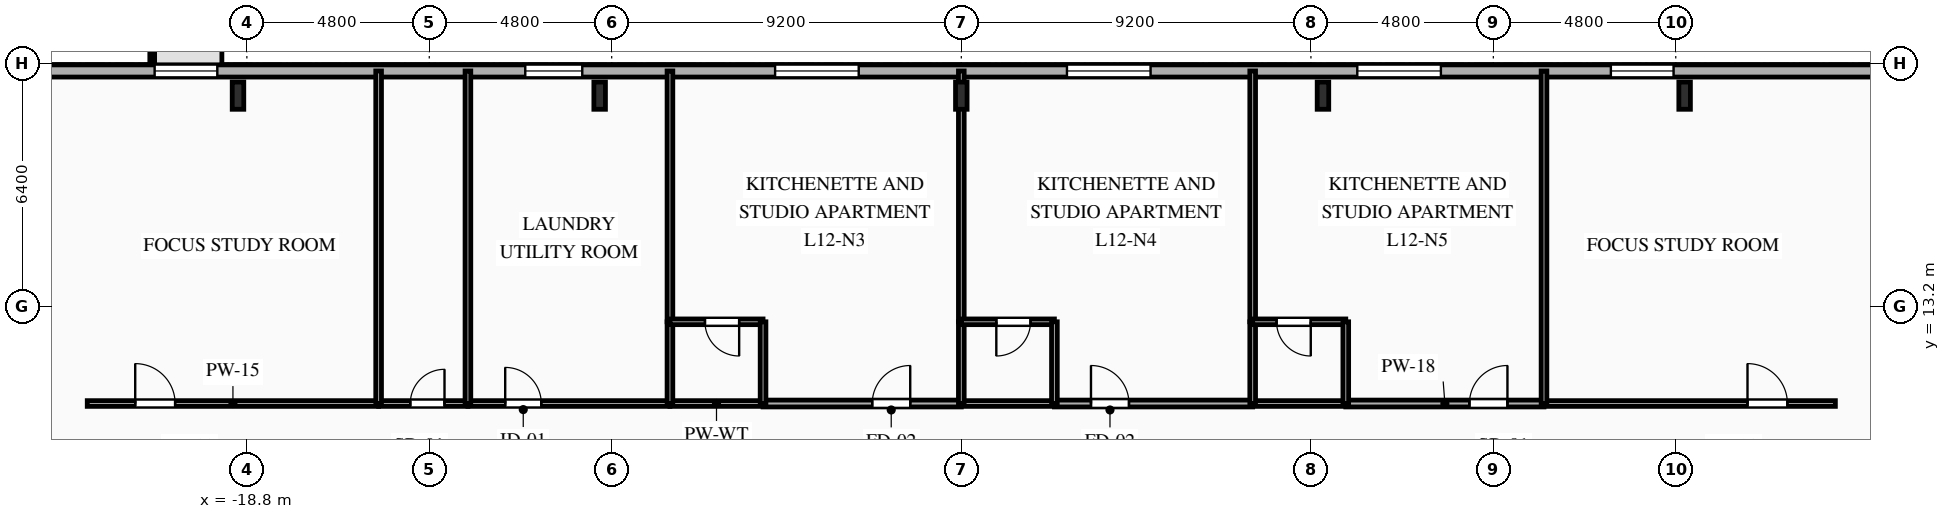
"""IFC4 building model, lengths in metres.
Left out: names, types, materials, properties, quantities, classifications, styles, units other than length and angle.
Written with IfcOpenShell. Run it as: python <this file> out.ifc"""

import sys

from ifc_helpers import new_model, si_unit, direction, frame, frame_2d, origin, origin_2d, place, context, subcontext, project, spatial, rectangle, i_section, extrude, element, fill, save


model = new_model("IFC4")
c1 = context("Model", 3, precision=1e-05, world=origin(), true_north=direction((0.0, 1.0)))
c2 = subcontext(c1, "Body", "Model", "MODEL_VIEW")
j1 = project(units=[si_unit("LENGTHUNIT", "METRE"), si_unit("PLANEANGLEUNIT", "RADIAN")], contexts=[c1])
p1 = place(None, origin())
s1 = spatial("IfcSite", under=j1, at=p1, CompositionType="ELEMENT")
p2 = place(p1, origin())
s2 = spatial("IfcBuilding", under=s1, at=p2, CompositionType="ELEMENT")
p3 = place(p2, frame((0.0, 0.0, 47.1)))
s3 = spatial("IfcBuildingStorey", under=s2, at=p3, CompositionType="ELEMENT", Elevation=47.1)
for number, where, z_axis, x_axis in (
    (1, (19.033, 18.75, 0.0), (0.0, 0.0, 1.0), (1.0, 0.0, 0.0)),
    (2, (9.517, 18.75, 0.0), (0.0, 0.0, 1.0), (1.0, 0.0, 0.0)),
    (3, (0.0, 18.75, 0.0), (0.0, 0.0, 1.0), (1.0, 0.0, 0.0)),
    (4, (-9.517, 18.75, 0.0), (0.0, 0.0, 1.0), (1.0, 0.0, 0.0)),
    (5, (-19.033, 18.75, 0.0), (0.0, 0.0, 1.0), (1.0, 0.0, 0.0)),
):
    element("IfcColumn", number, at=place(p3, frame(where, z_axis=z_axis, x_axis=x_axis)), inside=s3, PredefinedType="COLUMN", context=c2, shape_type="SweptSolid", body=[
        extrude(i_section(OverallWidth=0.304, OverallDepth=0.716, WebThickness=0.021, FlangeThickness=0.04, FilletRadius=0.027, at=origin_2d()), origin(), (0.0, 0.0, 1.0), 3.35),
    ])
p4 = place(p3, frame((-29.2, 19.4, 0.0), z_axis=(0.0, 0.0, 1.0), x_axis=(1.0, 0.0, 0.0)))
e6 = element("IfcWall", 6, at=p4, inside=s3, PredefinedType="SOLIDWALL", context=c2, shape_type="SweptSolid", body=[
    extrude(rectangle(XDim=58.4, YDim=0.32, at=frame_2d((29.2, 0.0))), origin(), (0.0, 0.0, 1.0), 3.035),
])
p5 = place(p4, frame((7.972, 0.0, 0.85)))
e7 = element("IfcOpeningElement", 7, at=p5, cuts=e6, PredefinedType="OPENING", context=c2, shape_type="SweptSolid", body=[
    extrude(rectangle(XDim=1.65, YDim=1.85, at=frame_2d((0.825, 0.925))), frame((0.0, 0.17, 0.0), z_axis=(0.0, -1.0, 0.0), x_axis=(1.0, 0.0, 0.0)), (0.0, 0.0, 1.0), 0.34),
])
p6 = place(p4, frame((17.726, 0.0, 0.85)))
e8 = element("IfcOpeningElement", 8, at=p6, cuts=e6, PredefinedType="OPENING", context=c2, shape_type="SweptSolid", body=[
    extrude(rectangle(XDim=1.5, YDim=1.85, at=frame_2d((0.75, 0.925))), frame((0.0, 0.17, 0.0), z_axis=(0.0, -1.0, 0.0), x_axis=(1.0, 0.0, 0.0)), (0.0, 0.0, 1.0), 0.34),
])
p7 = place(p4, frame((24.3, 0.0, 0.85)))
e9 = element("IfcOpeningElement", 9, at=p7, cuts=e6, PredefinedType="OPENING", context=c2, shape_type="SweptSolid", body=[
    extrude(rectangle(XDim=2.2, YDim=1.85, at=frame_2d((1.1, 0.925))), frame((0.0, 0.17, 0.0), z_axis=(0.0, -1.0, 0.0), x_axis=(1.0, 0.0, 0.0)), (0.0, 0.0, 1.0), 0.34),
])
p8 = place(p4, frame((31.98, 0.0, 0.85)))
e10 = element("IfcOpeningElement", 10, at=p8, cuts=e6, PredefinedType="OPENING", context=c2, shape_type="SweptSolid", body=[
    extrude(rectangle(XDim=2.2, YDim=1.85, at=frame_2d((1.1, 0.925))), frame((0.0, 0.17, 0.0), z_axis=(0.0, -1.0, 0.0), x_axis=(1.0, 0.0, 0.0)), (0.0, 0.0, 1.0), 0.34),
])
p9 = place(p4, frame((39.62, 0.0, 0.85)))
e11 = element("IfcOpeningElement", 11, at=p9, cuts=e6, PredefinedType="OPENING", context=c2, shape_type="SweptSolid", body=[
    extrude(rectangle(XDim=2.2, YDim=1.85, at=frame_2d((1.1, 0.925))), frame((0.0, 0.17, 0.0), z_axis=(0.0, -1.0, 0.0), x_axis=(1.0, 0.0, 0.0)), (0.0, 0.0, 1.0), 0.34),
])
p10 = place(p4, frame((46.292, 0.0, 0.85)))
e12 = element("IfcOpeningElement", 12, at=p10, cuts=e6, PredefinedType="OPENING", context=c2, shape_type="SweptSolid", body=[
    extrude(rectangle(XDim=1.65, YDim=1.85, at=frame_2d((0.825, 0.925))), frame((0.0, 0.17, 0.0), z_axis=(0.0, -1.0, 0.0), x_axis=(1.0, 0.0, 0.0)), (0.0, 0.0, 1.0), 0.34),
])
p11 = place(p3, frame((-23.0, 10.65, 0.0), z_axis=(0.0, 0.0, 1.0), x_axis=(1.0, 0.0, 0.0)))
e13 = element("IfcWall", 13, at=p11, inside=s3, PredefinedType="PARTITIONING", context=c2, shape_type="SweptSolid", body=[
    extrude(rectangle(XDim=7.667, YDim=0.15, at=frame_2d((3.833, 0.0))), origin(), (0.0, 0.0, 1.0), 3.035),
])
p12 = place(p11, frame((1.262, 0.0, 0.0)))
e14 = element("IfcOpeningElement", 14, at=p12, cuts=e13, PredefinedType="OPENING", context=c2, shape_type="SweptSolid", body=[
    extrude(rectangle(XDim=1.05, YDim=2.15, at=frame_2d((0.525, 1.075))), frame((0.0, 0.085, 0.0), z_axis=(0.0, -1.0, 0.0), x_axis=(1.0, 0.0, 0.0)), (0.0, 0.0, 1.0), 0.17),
])
p13 = place(p3, frame((-15.333, 10.65, 0.0), z_axis=(0.0, 0.0, 1.0), x_axis=(1.0, 0.0, 0.0)))
e15 = element("IfcWall", 15, at=p13, inside=s3, PredefinedType="PLUMBINGWALL", context=c2, shape_type="SweptSolid", body=[
    extrude(rectangle(XDim=2.35, YDim=0.15, at=frame_2d((1.175, 0.0))), origin(), (0.0, 0.0, 1.0), 3.035),
])
p14 = place(p13, frame((0.834, 0.0, 0.0)))
e16 = element("IfcOpeningElement", 16, at=p14, cuts=e15, PredefinedType="OPENING", context=c2, shape_type="SweptSolid", body=[
    extrude(rectangle(XDim=0.9, YDim=2.1, at=frame_2d((0.45, 1.05))), frame((0.0, 0.085, 0.0), z_axis=(0.0, -1.0, 0.0), x_axis=(1.0, 0.0, 0.0)), (0.0, 0.0, 1.0), 0.17),
])
p15 = place(p3, frame((-12.983, 10.65, 0.0), z_axis=(0.0, 0.0, 1.0), x_axis=(1.0, 0.0, 0.0)))
e17 = element("IfcWall", 17, at=p15, inside=s3, PredefinedType="PARTITIONING", context=c2, shape_type="SweptSolid", body=[
    extrude(rectangle(XDim=5.316, YDim=0.15, at=frame_2d((2.658, 0.0))), origin(), (0.0, 0.0, 1.0), 3.035),
])
p16 = place(p15, frame((0.981, 0.0, 0.0)))
e18 = element("IfcOpeningElement", 18, at=p16, cuts=e17, PredefinedType="OPENING", context=c2, shape_type="SweptSolid", body=[
    extrude(rectangle(XDim=0.95, YDim=2.1, at=frame_2d((0.475, 1.05))), frame((0.0, 0.085, 0.0), z_axis=(0.0, -1.0, 0.0), x_axis=(1.0, 0.0, 0.0)), (0.0, 0.0, 1.0), 0.17),
])
p17 = place(p3, frame((-5.217, 10.65, 0.0), z_axis=(0.0, 0.0, 1.0), x_axis=(1.0, 0.0, 0.0)))
e19 = element("IfcWall", 19, at=p17, inside=s3, PredefinedType="PARTITIONING", context=c2, shape_type="SweptSolid", body=[
    extrude(rectangle(XDim=5.217, YDim=0.18, at=frame_2d((2.608, 0.0))), origin(), (0.0, 0.0, 1.0), 3.035),
])
p18 = place(p17, frame((2.873, 0.0, 0.0)))
e20 = element("IfcOpeningElement", 20, at=p18, cuts=e19, PredefinedType="OPENING", context=c2, shape_type="SweptSolid", body=[
    extrude(rectangle(XDim=1.0, YDim=2.15, at=frame_2d((0.5, 1.075))), frame((0.0, 0.1, 0.0), z_axis=(0.0, -1.0, 0.0), x_axis=(1.0, 0.0, 0.0)), (0.0, 0.0, 1.0), 0.2),
])
p19 = place(p3, frame((-7.667, 10.65, 0.0), z_axis=(0.0, 0.0, 1.0), x_axis=(1.0, 0.0, 0.0)))
e21 = element("IfcWall", 21, at=p19, inside=s3, PredefinedType="PLUMBINGWALL", context=c2, shape_type="SweptSolid", body=[
    extrude(rectangle(XDim=2.45, YDim=0.15, at=frame_2d((1.225, 0.0))), origin(), (0.0, 0.0, 1.0), 3.035),
])
p20 = place(p3, frame((2.45, 10.65, 0.0), z_axis=(0.0, 0.0, 1.0), x_axis=(1.0, 0.0, 0.0)))
e22 = element("IfcWall", 22, at=p20, inside=s3, PredefinedType="PARTITIONING", context=c2, shape_type="SweptSolid", body=[
    extrude(rectangle(XDim=5.217, YDim=0.18, at=frame_2d((2.608, 0.0))), origin(), (0.0, 0.0, 1.0), 3.035),
])
p21 = place(p20, frame((0.962, 0.0, 0.0)))
e23 = element("IfcOpeningElement", 23, at=p21, cuts=e22, PredefinedType="OPENING", context=c2, shape_type="SweptSolid", body=[
    extrude(rectangle(XDim=1.0, YDim=2.15, at=frame_2d((0.5, 1.075))), frame((0.0, 0.1, 0.0), z_axis=(0.0, -1.0, 0.0), x_axis=(1.0, 0.0, 0.0)), (0.0, 0.0, 1.0), 0.2),
])
p22 = place(p3, frame((0.0, 10.65, 0.0), z_axis=(0.0, 0.0, 1.0), x_axis=(1.0, 0.0, 0.0)))
e24 = element("IfcWall", 24, at=p22, inside=s3, PredefinedType="PLUMBINGWALL", context=c2, shape_type="SweptSolid", body=[
    extrude(rectangle(XDim=2.45, YDim=0.15, at=frame_2d((1.225, 0.0))), origin(), (0.0, 0.0, 1.0), 3.035),
])
p23 = place(p3, frame((10.117, 10.65, 0.0), z_axis=(0.0, 0.0, 1.0), x_axis=(1.0, 0.0, 0.0)))
e25 = element("IfcWall", 25, at=p23, inside=s3, PredefinedType="PARTITIONING", context=c2, shape_type="SweptSolid", body=[
    extrude(rectangle(XDim=5.216, YDim=0.18, at=frame_2d((2.608, 0.0))), origin(), (0.0, 0.0, 1.0), 3.035),
])
p24 = place(p23, frame((3.254, 0.0, 0.0)))
e26 = element("IfcOpeningElement", 26, at=p24, cuts=e25, PredefinedType="OPENING", context=c2, shape_type="SweptSolid", body=[
    extrude(rectangle(XDim=1.0, YDim=2.15, at=frame_2d((0.5, 1.075))), frame((0.0, 0.1, 0.0), z_axis=(0.0, -1.0, 0.0), x_axis=(1.0, 0.0, 0.0)), (0.0, 0.0, 1.0), 0.2),
])
p25 = place(p3, frame((7.667, 10.65, 0.0), z_axis=(0.0, 0.0, 1.0), x_axis=(1.0, 0.0, 0.0)))
e27 = element("IfcWall", 27, at=p25, inside=s3, PredefinedType="PLUMBINGWALL", context=c2, shape_type="SweptSolid", body=[
    extrude(rectangle(XDim=2.45, YDim=0.15, at=frame_2d((1.225, 0.0))), origin(), (0.0, 0.0, 1.0), 3.035),
])
p26 = place(p3, frame((15.333, 10.65, 0.0), z_axis=(0.0, 0.0, 1.0), x_axis=(1.0, 0.0, 0.0)))
e28 = element("IfcWall", 28, at=p26, inside=s3, PredefinedType="PARTITIONING", context=c2, shape_type="SweptSolid", body=[
    extrude(rectangle(XDim=7.667, YDim=0.15, at=frame_2d((3.833, 0.0))), origin(), (0.0, 0.0, 1.0), 3.035),
])
p27 = place(p26, frame((5.355, 0.0, 0.0)))
e29 = element("IfcOpeningElement", 29, at=p27, cuts=e28, PredefinedType="OPENING", context=c2, shape_type="SweptSolid", body=[
    extrude(rectangle(XDim=1.05, YDim=2.15, at=frame_2d((0.525, 1.075))), frame((0.0, 0.085, 0.0), z_axis=(0.0, -1.0, 0.0), x_axis=(1.0, 0.0, 0.0)), (0.0, 0.0, 1.0), 0.17),
])
for number, where, z_axis, x_axis in (
    (30, (-15.333, 19.4, 0.0), (0.0, 0.0, 1.0), (0.0, -1.0, 0.0)),
    (31, (-12.983, 19.4, 0.0), (0.0, 0.0, 1.0), (0.0, -1.0, 0.0)),
):
    element("IfcWall", number, at=place(p3, frame(where, z_axis=z_axis, x_axis=x_axis)), inside=s3, PredefinedType="PLUMBINGWALL", context=c2, shape_type="SweptSolid", body=[
        extrude(rectangle(XDim=8.75, YDim=0.15, at=frame_2d((4.375, 0.0))), origin(), (0.0, 0.0, 1.0), 3.035),
    ])
p28 = place(p3, frame((-7.667, 19.4, 0.0), z_axis=(0.0, 0.0, 1.0), x_axis=(0.0, -1.0, 0.0)))
e32 = element("IfcWall", 32, at=p28, inside=s3, PredefinedType="PARTITIONING", context=c2, shape_type="SweptSolid", body=[
    extrude(rectangle(XDim=6.6, YDim=0.15, at=frame_2d((3.3, 0.0))), origin(), (0.0, 0.0, 1.0), 3.035),
])
p29 = place(p3, frame((-7.667, 12.8, 0.0), z_axis=(0.0, 0.0, 1.0), x_axis=(0.0, -1.0, 0.0)))
e33 = element("IfcWall", 33, at=p29, inside=s3, PredefinedType="PLUMBINGWALL", context=c2, shape_type="SweptSolid", body=[
    extrude(rectangle(XDim=2.15, YDim=0.15, at=frame_2d((1.075, 0.0))), origin(), (0.0, 0.0, 1.0), 3.035),
])
p30 = place(p3, frame((-5.217, 12.8, 0.0), z_axis=(0.0, 0.0, 1.0), x_axis=(-1.0, 0.0, 0.0)))
e34 = element("IfcWall", 34, at=p30, inside=s3, PredefinedType="PLUMBINGWALL", context=c2, shape_type="SweptSolid", body=[
    extrude(rectangle(XDim=2.45, YDim=0.15, at=frame_2d((1.225, 0.0))), origin(), (0.0, 0.0, 1.0), 3.035),
])
p31 = place(p30, frame((0.629, 0.0, 0.0)))
e35 = element("IfcOpeningElement", 35, at=p31, cuts=e34, PredefinedType="OPENING", context=c2, shape_type="SweptSolid", body=[
    extrude(rectangle(XDim=0.9, YDim=2.1, at=frame_2d((0.45, 1.05))), frame((0.0, 0.085, 0.0), z_axis=(0.0, -1.0, 0.0), x_axis=(1.0, 0.0, 0.0)), (0.0, 0.0, 1.0), 0.17),
])
p32 = place(p3, frame((-5.217, 10.65, 0.0), z_axis=(0.0, 0.0, 1.0), x_axis=(0.0, 1.0, 0.0)))
e36 = element("IfcWall", 36, at=p32, inside=s3, PredefinedType="PLUMBINGWALL", context=c2, shape_type="SweptSolid", body=[
    extrude(rectangle(XDim=2.15, YDim=0.15, at=frame_2d((1.075, 0.0))), origin(), (0.0, 0.0, 1.0), 3.035),
])
p33 = place(p3, frame((0.0, 19.4, 0.0), z_axis=(0.0, 0.0, 1.0), x_axis=(0.0, -1.0, 0.0)))
e37 = element("IfcWall", 37, at=p33, inside=s3, PredefinedType="PARTITIONING", context=c2, shape_type="SweptSolid", body=[
    extrude(rectangle(XDim=6.6, YDim=0.15, at=frame_2d((3.3, 0.0))), origin(), (0.0, 0.0, 1.0), 3.035),
])
p34 = place(p3, frame((0.0, 12.8, 0.0), z_axis=(0.0, 0.0, 1.0), x_axis=(0.0, -1.0, 0.0)))
e38 = element("IfcWall", 38, at=p34, inside=s3, PredefinedType="PLUMBINGWALL", context=c2, shape_type="SweptSolid", body=[
    extrude(rectangle(XDim=2.15, YDim=0.15, at=frame_2d((1.075, 0.0))), origin(), (0.0, 0.0, 1.0), 3.035),
])
p35 = place(p3, frame((2.45, 12.8, 0.0), z_axis=(0.0, 0.0, 1.0), x_axis=(-1.0, 0.0, 0.0)))
e39 = element("IfcWall", 39, at=p35, inside=s3, PredefinedType="PLUMBINGWALL", context=c2, shape_type="SweptSolid", body=[
    extrude(rectangle(XDim=2.45, YDim=0.15, at=frame_2d((1.225, 0.0))), origin(), (0.0, 0.0, 1.0), 3.035),
])
p36 = place(p35, frame((0.629, 0.0, 0.0)))
e40 = element("IfcOpeningElement", 40, at=p36, cuts=e39, PredefinedType="OPENING", context=c2, shape_type="SweptSolid", body=[
    extrude(rectangle(XDim=0.9, YDim=2.1, at=frame_2d((0.45, 1.05))), frame((0.0, 0.085, 0.0), z_axis=(0.0, -1.0, 0.0), x_axis=(1.0, 0.0, 0.0)), (0.0, 0.0, 1.0), 0.17),
])
p37 = place(p3, frame((2.45, 10.65, 0.0), z_axis=(0.0, 0.0, 1.0), x_axis=(0.0, 1.0, 0.0)))
e41 = element("IfcWall", 41, at=p37, inside=s3, PredefinedType="PLUMBINGWALL", context=c2, shape_type="SweptSolid", body=[
    extrude(rectangle(XDim=2.15, YDim=0.15, at=frame_2d((1.075, 0.0))), origin(), (0.0, 0.0, 1.0), 3.035),
])
p38 = place(p3, frame((7.667, 19.4, 0.0), z_axis=(0.0, 0.0, 1.0), x_axis=(0.0, -1.0, 0.0)))
e42 = element("IfcWall", 42, at=p38, inside=s3, PredefinedType="PARTITIONING", context=c2, shape_type="SweptSolid", body=[
    extrude(rectangle(XDim=6.6, YDim=0.15, at=frame_2d((3.3, 0.0))), origin(), (0.0, 0.0, 1.0), 3.035),
])
p39 = place(p3, frame((7.667, 12.8, 0.0), z_axis=(0.0, 0.0, 1.0), x_axis=(0.0, -1.0, 0.0)))
e43 = element("IfcWall", 43, at=p39, inside=s3, PredefinedType="PLUMBINGWALL", context=c2, shape_type="SweptSolid", body=[
    extrude(rectangle(XDim=2.15, YDim=0.15, at=frame_2d((1.075, 0.0))), origin(), (0.0, 0.0, 1.0), 3.035),
])
p40 = place(p3, frame((10.117, 12.8, 0.0), z_axis=(0.0, 0.0, 1.0), x_axis=(-1.0, 0.0, 0.0)))
e44 = element("IfcWall", 44, at=p40, inside=s3, PredefinedType="PLUMBINGWALL", context=c2, shape_type="SweptSolid", body=[
    extrude(rectangle(XDim=2.45, YDim=0.15, at=frame_2d((1.225, 0.0))), origin(), (0.0, 0.0, 1.0), 3.035),
])
p41 = place(p40, frame((0.921, 0.0, 0.0)))
e45 = element("IfcOpeningElement", 45, at=p41, cuts=e44, PredefinedType="OPENING", context=c2, shape_type="SweptSolid", body=[
    extrude(rectangle(XDim=0.9, YDim=2.1, at=frame_2d((0.45, 1.05))), frame((0.0, 0.085, 0.0), z_axis=(0.0, -1.0, 0.0), x_axis=(1.0, 0.0, 0.0)), (0.0, 0.0, 1.0), 0.17),
])
p42 = place(p3, frame((10.117, 10.65, 0.0), z_axis=(0.0, 0.0, 1.0), x_axis=(0.0, 1.0, 0.0)))
e46 = element("IfcWall", 46, at=p42, inside=s3, PredefinedType="PLUMBINGWALL", context=c2, shape_type="SweptSolid", body=[
    extrude(rectangle(XDim=2.15, YDim=0.15, at=frame_2d((1.075, 0.0))), origin(), (0.0, 0.0, 1.0), 3.035),
])
p43 = place(p3, frame((15.333, 19.4, 0.0), z_axis=(0.0, 0.0, 1.0), x_axis=(0.0, -1.0, 0.0)))
e47 = element("IfcWall", 47, at=p43, inside=s3, PredefinedType="PARTITIONING", context=c2, shape_type="SweptSolid", body=[
    extrude(rectangle(XDim=8.75, YDim=0.15, at=frame_2d((4.375, 0.0))), origin(), (0.0, 0.0, 1.0), 3.035),
])
p44 = place(p5, origin())
e48 = element("IfcWindow", 48, at=p44, inside=s3, PartitioningType="SINGLE_PANEL", PredefinedType="WINDOW", context=c2, shape_type="SweptSolid", body=[
    extrude(rectangle(XDim=1.65, YDim=1.85, at=frame_2d((0.825, 0.925))), frame((0.0, 0.03, 0.0), z_axis=(0.0, -1.0, 0.0), x_axis=(1.0, 0.0, 0.0)), (0.0, 0.0, 1.0), 0.06),
])
fill(e7, e48)
p45 = place(p6, origin())
e49 = element("IfcWindow", 49, at=p45, inside=s3, PartitioningType="SINGLE_PANEL", PredefinedType="WINDOW", context=c2, shape_type="SweptSolid", body=[
    extrude(rectangle(XDim=1.5, YDim=1.85, at=frame_2d((0.75, 0.925))), frame((0.0, 0.03, 0.0), z_axis=(0.0, -1.0, 0.0), x_axis=(1.0, 0.0, 0.0)), (0.0, 0.0, 1.0), 0.06),
])
fill(e8, e49)
p46 = place(p7, origin())
e50 = element("IfcWindow", 50, at=p46, inside=s3, PartitioningType="SINGLE_PANEL", PredefinedType="WINDOW", context=c2, shape_type="SweptSolid", body=[
    extrude(rectangle(XDim=2.2, YDim=1.85, at=frame_2d((1.1, 0.925))), frame((0.0, 0.03, 0.0), z_axis=(0.0, -1.0, 0.0), x_axis=(1.0, 0.0, 0.0)), (0.0, 0.0, 1.0), 0.06),
])
fill(e9, e50)
p47 = place(p8, origin())
e51 = element("IfcWindow", 51, at=p47, inside=s3, PartitioningType="SINGLE_PANEL", PredefinedType="WINDOW", context=c2, shape_type="SweptSolid", body=[
    extrude(rectangle(XDim=2.2, YDim=1.85, at=frame_2d((1.1, 0.925))), frame((0.0, 0.03, 0.0), z_axis=(0.0, -1.0, 0.0), x_axis=(1.0, 0.0, 0.0)), (0.0, 0.0, 1.0), 0.06),
])
fill(e10, e51)
p48 = place(p9, origin())
e52 = element("IfcWindow", 52, at=p48, inside=s3, PartitioningType="SINGLE_PANEL", PredefinedType="WINDOW", context=c2, shape_type="SweptSolid", body=[
    extrude(rectangle(XDim=2.2, YDim=1.85, at=frame_2d((1.1, 0.925))), frame((0.0, 0.03, 0.0), z_axis=(0.0, -1.0, 0.0), x_axis=(1.0, 0.0, 0.0)), (0.0, 0.0, 1.0), 0.06),
])
fill(e11, e52)
p49 = place(p10, origin())
e53 = element("IfcWindow", 53, at=p49, inside=s3, PartitioningType="SINGLE_PANEL", PredefinedType="WINDOW", context=c2, shape_type="SweptSolid", body=[
    extrude(rectangle(XDim=1.65, YDim=1.85, at=frame_2d((0.825, 0.925))), frame((0.0, 0.03, 0.0), z_axis=(0.0, -1.0, 0.0), x_axis=(1.0, 0.0, 0.0)), (0.0, 0.0, 1.0), 0.06),
])
fill(e12, e53)
p50 = place(p12, origin())
e54 = element("IfcDoor", 54, at=p50, inside=s3, OperationType="SINGLE_SWING_LEFT", PredefinedType="DOOR", context=c2, shape_type="SweptSolid", body=[
    extrude(rectangle(XDim=1.05, YDim=2.15, at=frame_2d((0.525, 1.075))), frame((0.0, 0.025, 0.0), z_axis=(0.0, -1.0, 0.0), x_axis=(1.0, 0.0, 0.0)), (0.0, 0.0, 1.0), 0.05),
])
fill(e14, e54)
p51 = place(p14, origin())
e55 = element("IfcDoor", 55, at=p51, inside=s3, OperationType="SINGLE_SWING_RIGHT", PredefinedType="DOOR", context=c2, shape_type="SweptSolid", body=[
    extrude(rectangle(XDim=0.9, YDim=2.1, at=frame_2d((0.45, 1.05))), frame((0.0, 0.025, 0.0), z_axis=(0.0, -1.0, 0.0), x_axis=(1.0, 0.0, 0.0)), (0.0, 0.0, 1.0), 0.05),
])
fill(e16, e55)
p52 = place(p16, origin())
e56 = element("IfcDoor", 56, at=p52, inside=s3, OperationType="SINGLE_SWING_LEFT", PredefinedType="DOOR", context=c2, shape_type="SweptSolid", body=[
    extrude(rectangle(XDim=0.95, YDim=2.1, at=frame_2d((0.475, 1.05))), frame((0.0, 0.025, 0.0), z_axis=(0.0, -1.0, 0.0), x_axis=(1.0, 0.0, 0.0)), (0.0, 0.0, 1.0), 0.05),
])
fill(e18, e56)
p53 = place(p18, origin())
e57 = element("IfcDoor", 57, at=p53, inside=s3, OperationType="SINGLE_SWING_RIGHT", PredefinedType="DOOR", context=c2, shape_type="SweptSolid", body=[
    extrude(rectangle(XDim=1.0, YDim=2.15, at=frame_2d((0.5, 1.075))), frame((0.0, 0.025, 0.0), z_axis=(0.0, -1.0, 0.0), x_axis=(1.0, 0.0, 0.0)), (0.0, 0.0, 1.0), 0.05),
])
fill(e20, e57)
p54 = place(p21, origin())
e58 = element("IfcDoor", 58, at=p54, inside=s3, OperationType="SINGLE_SWING_LEFT", PredefinedType="DOOR", context=c2, shape_type="SweptSolid", body=[
    extrude(rectangle(XDim=1.0, YDim=2.15, at=frame_2d((0.5, 1.075))), frame((0.0, 0.025, 0.0), z_axis=(0.0, -1.0, 0.0), x_axis=(1.0, 0.0, 0.0)), (0.0, 0.0, 1.0), 0.05),
])
fill(e23, e58)
p55 = place(p24, origin())
e59 = element("IfcDoor", 59, at=p55, inside=s3, OperationType="SINGLE_SWING_RIGHT", PredefinedType="DOOR", context=c2, shape_type="SweptSolid", body=[
    extrude(rectangle(XDim=1.0, YDim=2.15, at=frame_2d((0.5, 1.075))), frame((0.0, 0.025, 0.0), z_axis=(0.0, -1.0, 0.0), x_axis=(1.0, 0.0, 0.0)), (0.0, 0.0, 1.0), 0.05),
])
fill(e26, e59)
p56 = place(p27, origin())
e60 = element("IfcDoor", 60, at=p56, inside=s3, OperationType="SINGLE_SWING_LEFT", PredefinedType="DOOR", context=c2, shape_type="SweptSolid", body=[
    extrude(rectangle(XDim=1.05, YDim=2.15, at=frame_2d((0.525, 1.075))), frame((0.0, 0.025, 0.0), z_axis=(0.0, -1.0, 0.0), x_axis=(1.0, 0.0, 0.0)), (0.0, 0.0, 1.0), 0.05),
])
fill(e29, e60)
p57 = place(p31, origin())
e61 = element("IfcDoor", 61, at=p57, inside=s3, OperationType="SINGLE_SWING_LEFT", PredefinedType="DOOR", context=c2, shape_type="SweptSolid", body=[
    extrude(rectangle(XDim=0.9, YDim=2.1, at=frame_2d((0.45, 1.05))), frame((0.0, 0.025, 0.0), z_axis=(0.0, -1.0, 0.0), x_axis=(1.0, 0.0, 0.0)), (0.0, 0.0, 1.0), 0.05),
])
fill(e35, e61)
p58 = place(p36, origin())
e62 = element("IfcDoor", 62, at=p58, inside=s3, OperationType="SINGLE_SWING_RIGHT", PredefinedType="DOOR", context=c2, shape_type="SweptSolid", body=[
    extrude(rectangle(XDim=0.9, YDim=2.1, at=frame_2d((0.45, 1.05))), frame((0.0, 0.025, 0.0), z_axis=(0.0, -1.0, 0.0), x_axis=(1.0, 0.0, 0.0)), (0.0, 0.0, 1.0), 0.05),
])
fill(e40, e62)
p59 = place(p41, origin())
e63 = element("IfcDoor", 63, at=p59, inside=s3, OperationType="SINGLE_SWING_LEFT", PredefinedType="DOOR", context=c2, shape_type="SweptSolid", body=[
    extrude(rectangle(XDim=0.9, YDim=2.1, at=frame_2d((0.45, 1.05))), frame((0.0, 0.025, 0.0), z_axis=(0.0, -1.0, 0.0), x_axis=(1.0, 0.0, 0.0)), (0.0, 0.0, 1.0), 0.05),
])
fill(e45, e63)
save(model, sys.argv[1])
